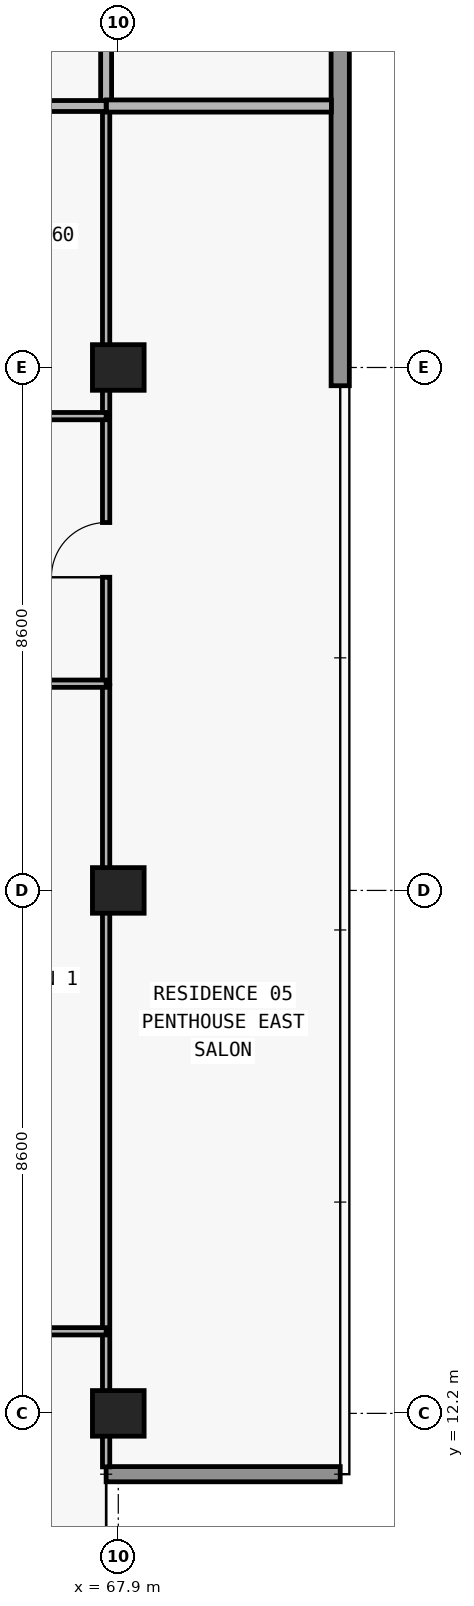
"""IFC4 building model, lengths in metres.
Left out: names, types, materials, properties, quantities, classifications, styles, units other than length and angle.
Written with IfcOpenShell. Run it as: python <this file> out.ifc"""

import sys

from ifc_helpers import new_model, si_unit, direction, frame, frame_2d, origin, origin_2d, place, context, subcontext, project, spatial, rectangle, extrude, element, fill, save


model = new_model("IFC4")
c1 = context("Model", 3, precision=1e-05, world=origin(), true_north=direction((0.0, 1.0)))
c2 = subcontext(c1, "Body", "Model", "MODEL_VIEW")
j1 = project(units=[si_unit("LENGTHUNIT", "METRE"), si_unit("PLANEANGLEUNIT", "RADIAN")], contexts=[c1])
p1 = place(None, origin())
s1 = spatial("IfcSite", under=j1, at=p1, CompositionType="ELEMENT")
p2 = place(p1, origin())
s2 = spatial("IfcBuilding", under=s1, at=p2, CompositionType="ELEMENT")
p3 = place(p2, frame((0.0, 0.0, 167.1)))
s3 = spatial("IfcBuildingStorey", under=s2, at=p3, CompositionType="ELEMENT", Elevation=167.1)
for number, where, z_axis, x_axis in (
    (1, (67.9, 12.2, 0.0), (0.0, 0.0, 1.0), (1.0, 0.0, 0.0)),
    (2, (67.9, 20.8, 0.0), (0.0, 0.0, 1.0), (1.0, 0.0, 0.0)),
    (3, (67.9, 29.4, 0.0), (0.0, 0.0, 1.0), (1.0, 0.0, 0.0)),
):
    element("IfcColumn", number, at=place(p3, frame(where, z_axis=z_axis, x_axis=x_axis)), inside=s3, PredefinedType="COLUMN", context=c2, shape_type="SweptSolid", body=[
        extrude(rectangle(XDim=0.85, YDim=0.75, at=origin_2d()), origin(), (0.0, 0.0, 1.0), 3.05),
    ])
p4 = place(p3, frame((67.7, 11.2, 0.0), z_axis=(0.0, 0.0, 1.0), x_axis=(1.0, 0.0, 0.0)))
e4 = element("IfcWall", 4, at=p4, inside=s3, PredefinedType="ELEMENTEDWALL", context=c2, shape_type="SweptSolid", body=[
    extrude(rectangle(XDim=3.85, YDim=0.25, at=frame_2d((1.925, 0.0))), origin(), (0.0, 0.0, 1.0), 3.05),
])
p5 = place(p3, frame((71.55, 47.0, 0.0), z_axis=(0.0, 0.0, 1.0), x_axis=(0.0, -1.0, 0.0)))
e5 = element("IfcWall", 5, at=p5, inside=s3, PredefinedType="STANDARD", context=c2, shape_type="SweptSolid", body=[
    extrude(rectangle(XDim=17.9, YDim=0.3, at=frame_2d((8.95, 0.0))), origin(), (0.0, 0.0, 1.0), 3.05),
])
p6 = place(p3, frame((67.7, 11.32, 0.0), z_axis=(0.0, 0.0, 1.0), x_axis=(0.0, 1.0, 0.0)))
e6 = element("IfcWall", 6, at=p6, inside=s3, PredefinedType="PARTITIONING", context=c2, shape_type="SweptSolid", body=[
    extrude(rectangle(XDim=12.85, YDim=0.12, at=frame_2d((6.425, 0.0))), origin(), (0.0, 0.0, 1.0), 2.263),
])
p7 = place(p3, frame((67.7, 24.2, 0.0), z_axis=(0.0, 0.0, 1.0), x_axis=(0.0, 1.0, 0.0)))
e7 = element("IfcWall", 7, at=p7, inside=s3, PredefinedType="PARTITIONING", context=c2, shape_type="SweptSolid", body=[
    extrude(rectangle(XDim=4.84, YDim=0.12, at=frame_2d((2.42, 0.0))), origin(), (0.0, 0.0, 1.0), 2.263),
])
p8 = place(p7, frame((1.75, 0.0, 0.0)))
e8 = element("IfcOpeningElement", 8, at=p8, cuts=e7, PredefinedType="OPENING", context=c2, shape_type="SweptSolid", body=[
    extrude(rectangle(XDim=0.9, YDim=2.15, at=frame_2d((0.45, 1.075))), frame((0.0, 0.07, 0.0), z_axis=(0.0, -1.0, 0.0), x_axis=(1.0, 0.0, 0.0)), (0.0, 0.0, 1.0), 0.14),
])
p9 = place(p3, frame((67.7, 29.1, 0.0), z_axis=(0.0, 0.0, 1.0), x_axis=(0.0, 1.0, 0.0)))
e9 = element("IfcWall", 9, at=p9, inside=s3, PredefinedType="PARTITIONING", context=c2, shape_type="SweptSolid", body=[
    extrude(rectangle(XDim=0.22, YDim=0.12, at=frame_2d((0.11, 0.0))), origin(), (0.0, 0.0, 1.0), 3.05),
])
p10 = place(p3, frame((67.7, 29.44, 0.0), z_axis=(0.0, 0.0, 1.0), x_axis=(0.0, 1.0, 0.0)))
e10 = element("IfcWall", 10, at=p10, inside=s3, PredefinedType="PARTITIONING", context=c2, shape_type="SweptSolid", body=[
    extrude(rectangle(XDim=4.26, YDim=0.12, at=frame_2d((2.13, 0.0))), origin(), (0.0, 0.0, 1.0), 2.263),
])
p11 = place(p3, frame((67.7, 33.705, 0.0), z_axis=(0.0, 0.0, 1.0), x_axis=(0.0, 1.0, 0.0)))
e11 = element("IfcWall", 11, at=p11, inside=s3, PredefinedType="PARTITIONING", context=c2, shape_type="SweptSolid", body=[
    extrude(rectangle(XDim=3.245, YDim=0.18, at=frame_2d((1.623, 0.0))), origin(), (0.0, 0.0, 1.0), 2.263),
])
p12 = place(p3, frame((59.55, 13.55, 0.0), z_axis=(0.0, 0.0, 1.0), x_axis=(1.0, 0.0, 0.0)))
e12 = element("IfcWall", 12, at=p12, inside=s3, PredefinedType="PARTITIONING", context=c2, shape_type="SweptSolid", body=[
    extrude(rectangle(XDim=8.15, YDim=0.12, at=frame_2d((4.075, 0.0))), origin(), (0.0, 0.0, 1.0), 3.05),
])
p13 = place(p12, frame((3.625, 0.0, 0.0)))
e13 = element("IfcOpeningElement", 13, at=p13, cuts=e12, PredefinedType="OPENING", context=c2, shape_type="SweptSolid", body=[
    extrude(rectangle(XDim=0.9, YDim=2.15, at=frame_2d((0.45, 1.075))), frame((0.0, 0.07, 0.0), z_axis=(0.0, -1.0, 0.0), x_axis=(1.0, 0.0, 0.0)), (0.0, 0.0, 1.0), 0.14),
])
p14 = place(p3, frame((59.55, 24.2, 0.0), z_axis=(0.0, 0.0, 1.0), x_axis=(1.0, 0.0, 0.0)))
e14 = element("IfcWall", 14, at=p14, inside=s3, PredefinedType="PARTITIONING", context=c2, shape_type="SweptSolid", body=[
    extrude(rectangle(XDim=8.15, YDim=0.12, at=frame_2d((4.075, 0.0))), origin(), (0.0, 0.0, 1.0), 3.05),
])
p15 = place(p14, frame((3.625, 0.0, 0.0)))
e15 = element("IfcOpeningElement", 15, at=p15, cuts=e14, PredefinedType="OPENING", context=c2, shape_type="SweptSolid", body=[
    extrude(rectangle(XDim=0.9, YDim=2.15, at=frame_2d((0.45, 1.075))), frame((0.0, 0.07, 0.0), z_axis=(0.0, -1.0, 0.0), x_axis=(1.0, 0.0, 0.0)), (0.0, 0.0, 1.0), 0.14),
])
p16 = place(p3, frame((59.55, 28.6, 0.0), z_axis=(0.0, 0.0, 1.0), x_axis=(1.0, 0.0, 0.0)))
e16 = element("IfcWall", 16, at=p16, inside=s3, PredefinedType="PARTITIONING", context=c2, shape_type="SweptSolid", body=[
    extrude(rectangle(XDim=8.15, YDim=0.12, at=frame_2d((4.075, 0.0))), origin(), (0.0, 0.0, 1.0), 3.05),
])
p17 = place(p16, frame((2.684, 0.0, 0.0)))
e17 = element("IfcOpeningElement", 17, at=p17, cuts=e16, PredefinedType="OPENING", context=c2, shape_type="SweptSolid", body=[
    extrude(rectangle(XDim=0.9, YDim=2.15, at=frame_2d((0.45, 1.075))), frame((0.0, 0.07, 0.0), z_axis=(0.0, -1.0, 0.0), x_axis=(1.0, 0.0, 0.0)), (0.0, 0.0, 1.0), 0.14),
])
p18 = place(p3, frame((59.55, 33.7, 0.0), z_axis=(0.0, 0.0, 1.0), x_axis=(1.0, 0.0, 0.0)))
e18 = element("IfcWall", 18, at=p18, inside=s3, PredefinedType="PARTITIONING", context=c2, shape_type="SweptSolid", body=[
    extrude(rectangle(XDim=8.15, YDim=0.18, at=frame_2d((4.075, 0.0))), origin(), (0.0, 0.0, 1.0), 3.05),
])
p19 = place(p3, frame((67.705, 33.7, 0.0), z_axis=(0.0, 0.0, 1.0), x_axis=(1.0, 0.0, 0.0)))
e19 = element("IfcWall", 19, at=p19, inside=s3, PredefinedType="PARTITIONING", context=c2, shape_type="SweptSolid", body=[
    extrude(rectangle(XDim=3.7, YDim=0.2, at=frame_2d((1.85, 0.0))), origin(), (0.0, 0.0, 1.0), 3.05),
])
p20 = place(p8, origin())
e20 = element("IfcDoor", 20, at=p20, inside=s3, OperationType="SINGLE_SWING_LEFT", PredefinedType="DOOR", context=c2, shape_type="SweptSolid", body=[
    extrude(rectangle(XDim=0.9, YDim=2.15, at=frame_2d((0.45, 1.075))), frame((0.0, 0.025, 0.0), z_axis=(0.0, -1.0, 0.0), x_axis=(1.0, 0.0, 0.0)), (0.0, 0.0, 1.0), 0.05),
])
fill(e8, e20)
save(model, sys.argv[1])
